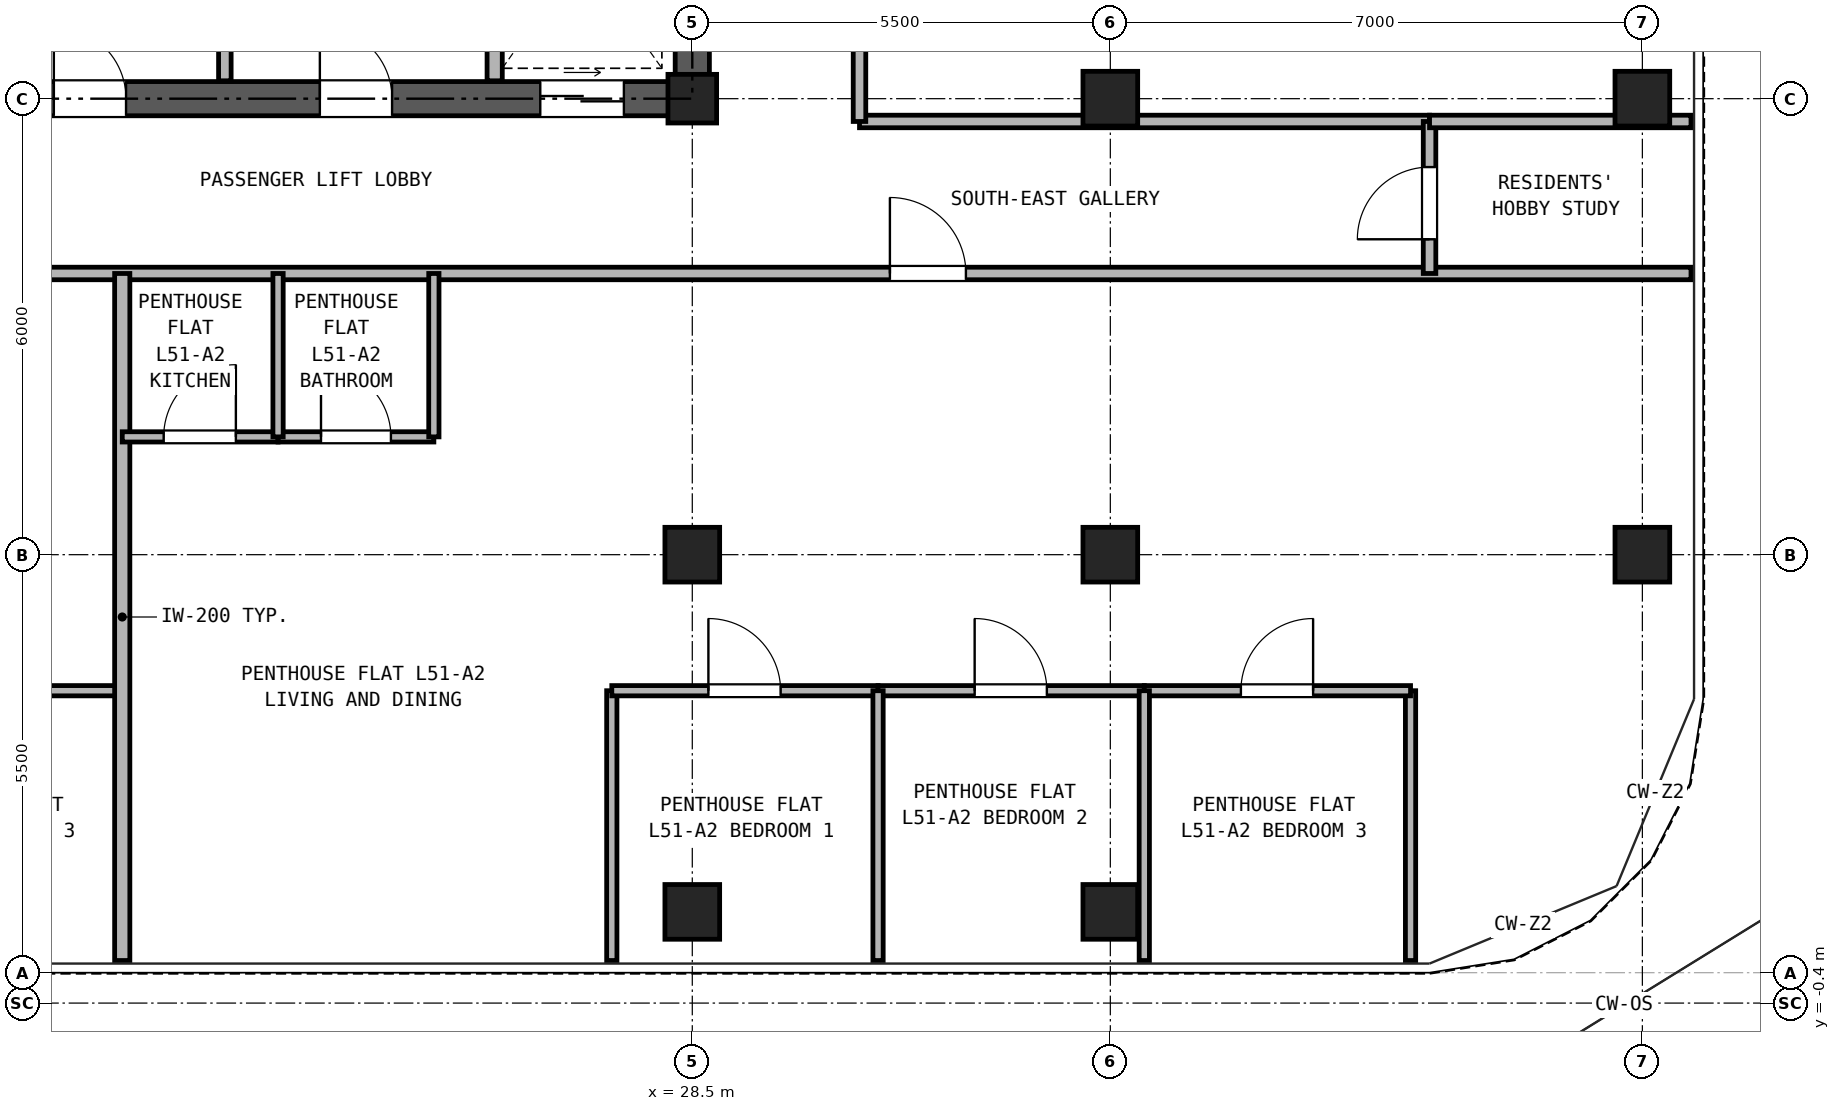
"""IFC4 building model, lengths in metres.
Left out: names, types, materials, properties, quantities, classifications, styles, units other than length and angle.
Written with IfcOpenShell. Run it as: python <this file> out.ifc"""

import sys

from ifc_helpers import new_model, si_unit, direction, frame, frame_2d, origin, origin_2d, place, context, subcontext, project, spatial, rectangle, hollow_rectangle, extrude, source, transform, mapped, element, fill, save


model = new_model("IFC4")
c1 = context("Model", 3, precision=1e-05, world=origin(), true_north=direction((0.0, 1.0)))
c2 = subcontext(c1, "Body", "Model", "MODEL_VIEW")
j1 = project(units=[si_unit("LENGTHUNIT", "METRE"), si_unit("PLANEANGLEUNIT", "RADIAN")], contexts=[c1])
p1 = place(None, origin())
s1 = spatial("IfcSite", under=j1, at=p1, CompositionType="ELEMENT")
p2 = place(p1, origin())
s2 = spatial("IfcBuilding", under=s1, at=p2, CompositionType="ELEMENT")
p3 = place(p2, frame((0.0, 0.0, 181.7)))
s3 = spatial("IfcBuildingStorey", under=s2, at=p3, CompositionType="ELEMENT", Elevation=181.7)
m1 = source(origin(), c2, "Body", "SweptSolid", [
    extrude(hollow_rectangle(XDim=0.72, YDim=0.72, WallThickness=0.04, at=origin_2d()), origin(), (0.0, 0.0, 1.0), 2.95),
])
for number, where, z_axis, x_axis in (
    (1, (28.5, 0.8, 0.0), (0.0, 0.0, 1.0), (1.0, 0.0, 0.0)),
    (2, (34.0, 0.8, 0.0), (0.0, 0.0, 1.0), (1.0, 0.0, 0.0)),
    (3, (41.0, 5.5, 0.0), (0.0, 0.0, 1.0), (1.0, 0.0, 0.0)),
    (4, (41.0, 11.5, 0.0), (0.0, 0.0, 1.0), (1.0, 0.0, 0.0)),
    (5, (28.5, 5.5, 0.0), (0.0, 0.0, 1.0), (1.0, 0.0, 0.0)),
):
    element("IfcColumn", number, at=place(p3, frame(where, z_axis=z_axis, x_axis=x_axis)), inside=s3, PredefinedType="COLUMN", context=c2, shape_type="MappedRepresentation", body=[
        mapped(m1, transform((0.0, 0.0, 0.0), x_axis=(1.0, 0.0, 0.0), y_axis=(0.0, 1.0, 0.0), z_axis=(0.0, 0.0, 1.0), scale=1.0)),
    ])
m2 = source(origin(), c2, "Body", "SweptSolid", [
    extrude(hollow_rectangle(XDim=0.64, YDim=0.64, WallThickness=0.035, at=origin_2d()), origin(), (0.0, 0.0, 1.0), 2.95),
])
p4 = place(p3, frame((28.5, 11.5, 0.0), z_axis=(0.0, 0.0, 1.0), x_axis=(1.0, 0.0, 0.0)))
e6 = element("IfcColumn", 6, at=p4, inside=s3, PredefinedType="COLUMN", context=c2, shape_type="MappedRepresentation", body=[
    mapped(m2, transform((0.0, 0.0, 0.0), x_axis=(1.0, 0.0, 0.0), y_axis=(0.0, 1.0, 0.0), z_axis=(0.0, 0.0, 1.0), scale=1.0)),
])
for number, where, z_axis, x_axis in (
    (7, (34.0, 5.5, 0.0), (0.0, 0.0, 1.0), (1.0, 0.0, 0.0)),
    (8, (34.0, 11.5, 0.0), (0.0, 0.0, 1.0), (1.0, 0.0, 0.0)),
):
    element("IfcColumn", number, at=place(p3, frame(where, z_axis=z_axis, x_axis=x_axis)), inside=s3, PredefinedType="COLUMN", context=c2, shape_type="MappedRepresentation", body=[
        mapped(m1, transform((0.0, 0.0, 0.0), x_axis=(1.0, 0.0, 0.0), y_axis=(0.0, 1.0, 0.0), z_axis=(0.0, 0.0, 1.0), scale=1.0)),
    ])
p5 = place(p3, frame((18.275, 11.5, 0.0), z_axis=(0.0, 0.0, 1.0), x_axis=(1.0, 0.0, 0.0)))
e9 = element("IfcWall", 9, at=p5, inside=s3, PredefinedType="SHEAR", context=c2, shape_type="SweptSolid", body=[
    extrude(rectangle(XDim=10.45, YDim=0.45, at=frame_2d((5.225, 0.0))), origin(), (0.0, 0.0, 1.0), 2.95),
])
p6 = place(p5, frame((1.825, 0.0, 0.0)))
e10 = element("IfcOpeningElement", 10, at=p6, cuts=e9, PredefinedType="OPENING", context=c2, shape_type="SweptSolid", body=[
    extrude(rectangle(XDim=0.95, YDim=2.15, at=frame_2d((0.475, 1.075))), frame((0.0, 0.235, 0.0), z_axis=(0.0, -1.0, 0.0), x_axis=(1.0, 0.0, 0.0)), (0.0, 0.0, 1.0), 0.47),
])
p7 = place(p5, frame((5.325, 0.0, 0.0)))
e11 = element("IfcOpeningElement", 11, at=p7, cuts=e9, PredefinedType="OPENING", context=c2, shape_type="SweptSolid", body=[
    extrude(rectangle(XDim=0.95, YDim=2.15, at=frame_2d((0.475, 1.075))), frame((0.0, 0.235, 0.0), z_axis=(0.0, -1.0, 0.0), x_axis=(1.0, 0.0, 0.0)), (0.0, 0.0, 1.0), 0.47),
])
p8 = place(p5, frame((8.225, 0.0, 0.0)))
e12 = element("IfcOpeningElement", 12, at=p8, cuts=e9, PredefinedType="OPENING", context=c2, shape_type="SweptSolid", body=[
    extrude(rectangle(XDim=1.1, YDim=2.25, at=frame_2d((0.55, 1.125))), frame((0.0, 0.235, 0.0), z_axis=(0.0, -1.0, 0.0), x_axis=(1.0, 0.0, 0.0)), (0.0, 0.0, 1.0), 0.47),
])
p9 = place(p3, frame((28.5, 11.725, 0.0), z_axis=(0.0, 0.0, 1.0), x_axis=(0.0, 1.0, 0.0)))
e13 = element("IfcWall", 13, at=p9, inside=s3, PredefinedType="SHEAR", context=c2, shape_type="SweptSolid", body=[
    extrude(rectangle(XDim=16.8, YDim=0.45, at=frame_2d((8.4, 0.0))), origin(), (0.0, 0.0, 1.0), 2.95),
])
p10 = place(p9, frame((7.425, 0.0, 0.0)))
e14 = element("IfcOpeningElement", 14, at=p10, cuts=e13, PredefinedType="OPENING", context=c2, shape_type="SweptSolid", body=[
    extrude(rectangle(XDim=1.15, YDim=2.2, at=frame_2d((0.575, 1.1))), frame((0.0, 0.235, 0.0), z_axis=(0.0, -1.0, 0.0), x_axis=(1.0, 0.0, 0.0)), (0.0, 0.0, 1.0), 0.47),
])
p11 = place(p3, frame((22.35, 11.735, 0.0), z_axis=(0.0, 0.0, 1.0), x_axis=(0.0, 1.0, 0.0)))
e15 = element("IfcWall", 15, at=p11, inside=s3, PredefinedType="PARTITIONING", context=c2, shape_type="SweptSolid", body=[
    extrude(rectangle(XDim=3.265, YDim=0.165, at=frame_2d((1.632, 0.0))), origin(), (0.0, 0.0, 1.0), 2.95),
])
p12 = place(p3, frame((25.9, 11.735, 0.0), z_axis=(0.0, 0.0, 1.0), x_axis=(0.0, 1.0, 0.0)))
e16 = element("IfcWall", 16, at=p12, inside=s3, PredefinedType="PARTITIONING", context=c2, shape_type="SweptSolid", body=[
    extrude(rectangle(XDim=3.265, YDim=0.2, at=frame_2d((1.632, 0.0))), origin(), (0.0, 0.0, 1.0), 2.95),
])
p13 = place(p3, frame((0.16, 9.2, 0.0), z_axis=(0.0, 0.0, 1.0), x_axis=(1.0, 0.0, 0.0)))
e17 = element("IfcWall", 17, at=p13, inside=s3, PredefinedType="PARTITIONING", context=c2, shape_type="SweptSolid", body=[
    extrude(rectangle(XDim=41.48, YDim=0.165, at=frame_2d((20.74, 0.0))), origin(), (0.0, 0.0, 1.0), 2.95),
])
p14 = place(p13, frame((15.565, 0.0, 0.0)))
e18 = element("IfcOpeningElement", 18, at=p14, cuts=e17, PredefinedType="OPENING", context=c2, shape_type="SweptSolid", body=[
    extrude(rectangle(XDim=1.0, YDim=2.15, at=frame_2d((0.5, 1.075))), frame((0.0, 0.093, 0.0), z_axis=(0.0, -1.0, 0.0), x_axis=(1.0, 0.0, 0.0)), (0.0, 0.0, 1.0), 0.185),
])
p15 = place(p13, frame((30.94, 0.0, 0.0)))
e19 = element("IfcOpeningElement", 19, at=p15, cuts=e17, PredefinedType="OPENING", context=c2, shape_type="SweptSolid", body=[
    extrude(rectangle(XDim=1.0, YDim=2.15, at=frame_2d((0.5, 1.075))), frame((0.0, 0.093, 0.0), z_axis=(0.0, -1.0, 0.0), x_axis=(1.0, 0.0, 0.0)), (0.0, 0.0, 1.0), 0.185),
])
p16 = place(p3, frame((30.7, 11.2, 0.0), z_axis=(0.0, 0.0, 1.0), x_axis=(1.0, 0.0, 0.0)))
e20 = element("IfcWall", 20, at=p16, inside=s3, PredefinedType="PARTITIONING", context=c2, shape_type="SweptSolid", body=[
    extrude(rectangle(XDim=7.5, YDim=0.165, at=frame_2d((3.75, 0.0))), origin(), (0.0, 0.0, 1.0), 2.95),
])
p17 = place(p3, frame((38.2, 9.2, 0.0), z_axis=(0.0, 0.0, 1.0), x_axis=(0.0, 1.0, 0.0)))
e21 = element("IfcWall", 21, at=p17, inside=s3, PredefinedType="PARTITIONING", context=c2, shape_type="SweptSolid", body=[
    extrude(rectangle(XDim=2.0, YDim=0.165, at=frame_2d((1.0, 0.0))), origin(), (0.0, 0.0, 1.0), 2.95),
])
p18 = place(p17, frame((0.45, 0.0, 0.0)))
e22 = element("IfcOpeningElement", 22, at=p18, cuts=e21, PredefinedType="OPENING", context=c2, shape_type="SweptSolid", body=[
    extrude(rectangle(XDim=0.95, YDim=2.15, at=frame_2d((0.475, 1.075))), frame((0.0, 0.093, 0.0), z_axis=(0.0, -1.0, 0.0), x_axis=(1.0, 0.0, 0.0)), (0.0, 0.0, 1.0), 0.185),
])
p19 = place(p3, frame((30.7, 11.2, 0.0), z_axis=(0.0, 0.0, 1.0), x_axis=(0.0, 1.0, 0.0)))
e23 = element("IfcWall", 23, at=p19, inside=s3, PredefinedType="PARTITIONING", context=c2, shape_type="SweptSolid", body=[
    extrude(rectangle(XDim=23.94, YDim=0.165, at=frame_2d((11.97, 0.0))), origin(), (0.0, 0.0, 1.0), 2.95),
])
p20 = place(p19, frame((5.15, 0.0, 0.0)))
e24 = element("IfcOpeningElement", 24, at=p20, cuts=e23, PredefinedType="OPENING", context=c2, shape_type="SweptSolid", body=[
    extrude(rectangle(XDim=0.95, YDim=2.15, at=frame_2d((0.475, 1.075))), frame((0.0, 0.093, 0.0), z_axis=(0.0, -1.0, 0.0), x_axis=(1.0, 0.0, 0.0)), (0.0, 0.0, 1.0), 0.185),
])
p21 = place(p19, frame((14.3, 0.0, 0.0)))
e25 = element("IfcOpeningElement", 25, at=p21, cuts=e23, PredefinedType="OPENING", context=c2, shape_type="SweptSolid", body=[
    extrude(rectangle(XDim=0.95, YDim=2.15, at=frame_2d((0.475, 1.075))), frame((0.0, 0.093, 0.0), z_axis=(0.0, -1.0, 0.0), x_axis=(1.0, 0.0, 0.0)), (0.0, 0.0, 1.0), 0.185),
])
p22 = place(p19, frame((20.62, 0.0, 0.0)))
e26 = element("IfcOpeningElement", 26, at=p22, cuts=e23, PredefinedType="OPENING", context=c2, shape_type="SweptSolid", body=[
    extrude(rectangle(XDim=0.95, YDim=2.15, at=frame_2d((0.475, 1.075))), frame((0.0, 0.093, 0.0), z_axis=(0.0, -1.0, 0.0), x_axis=(1.0, 0.0, 0.0)), (0.0, 0.0, 1.0), 0.185),
])
p23 = place(p3, frame((17.456, 3.71, 0.0), z_axis=(0.0, 0.0, 1.0), x_axis=(1.0, 0.0, 0.0)))
e27 = element("IfcWall", 27, at=p23, inside=s3, PredefinedType="PARTITIONING", context=c2, shape_type="SweptSolid", body=[
    extrude(rectangle(XDim=3.544, YDim=0.135, at=frame_2d((1.772, 0.0))), origin(), (0.0, 0.0, 1.0), 2.95),
])
p24 = place(p23, frame((1.292, 0.0, 0.0)))
e28 = element("IfcOpeningElement", 28, at=p24, cuts=e27, PredefinedType="OPENING", context=c2, shape_type="SweptSolid", body=[
    extrude(rectangle(XDim=0.95, YDim=2.15, at=frame_2d((0.475, 1.075))), frame((0.0, 0.077, 0.0), z_axis=(0.0, -1.0, 0.0), x_axis=(1.0, 0.0, 0.0)), (0.0, 0.0, 1.0), 0.155),
])
p25 = place(p3, frame((21.0, 0.16, 0.0), z_axis=(0.0, 0.0, 1.0), x_axis=(0.0, 1.0, 0.0)))
e29 = element("IfcWall", 29, at=p25, inside=s3, PredefinedType="PARTITIONING", context=c2, shape_type="SweptSolid", body=[
    extrude(rectangle(XDim=9.04, YDim=0.2, at=frame_2d((4.52, 0.0))), origin(), (0.0, 0.0, 1.0), 2.95),
])
p26 = place(p3, frame((21.0, 7.05, 0.0), z_axis=(0.0, 0.0, 1.0), x_axis=(1.0, 0.0, 0.0)))
e30 = element("IfcWall", 30, at=p26, inside=s3, PredefinedType="PARTITIONING", context=c2, shape_type="SweptSolid", body=[
    extrude(rectangle(XDim=2.05, YDim=0.135, at=frame_2d((1.025, 0.0))), origin(), (0.0, 0.0, 1.0), 2.95),
])
p27 = place(p26, frame((0.545, 0.0, 0.0)))
e31 = element("IfcOpeningElement", 31, at=p27, cuts=e30, PredefinedType="OPENING", context=c2, shape_type="SweptSolid", body=[
    extrude(rectangle(XDim=0.95, YDim=2.15, at=frame_2d((0.475, 1.075))), frame((0.0, 0.077, 0.0), z_axis=(0.0, -1.0, 0.0), x_axis=(1.0, 0.0, 0.0)), (0.0, 0.0, 1.0), 0.155),
])
p28 = place(p3, frame((23.05, 7.05, 0.0), z_axis=(0.0, 0.0, 1.0), x_axis=(1.0, 0.0, 0.0)))
e32 = element("IfcWall", 32, at=p28, inside=s3, PredefinedType="PARTITIONING", context=c2, shape_type="SweptSolid", body=[
    extrude(rectangle(XDim=2.05, YDim=0.135, at=frame_2d((1.025, 0.0))), origin(), (0.0, 0.0, 1.0), 2.95),
])
p29 = place(p28, frame((0.565, 0.0, 0.0)))
e33 = element("IfcOpeningElement", 33, at=p29, cuts=e32, PredefinedType="OPENING", context=c2, shape_type="SweptSolid", body=[
    extrude(rectangle(XDim=0.92, YDim=2.1, at=frame_2d((0.46, 1.05))), frame((0.0, 0.077, 0.0), z_axis=(0.0, -1.0, 0.0), x_axis=(1.0, 0.0, 0.0)), (0.0, 0.0, 1.0), 0.155),
])
for number, where, z_axis, x_axis in (
    (34, (23.05, 7.05, 0.0), (0.0, 0.0, 1.0), (0.0, 1.0, 0.0)),
    (35, (25.1, 7.05, 0.0), (0.0, 0.0, 1.0), (0.0, 1.0, 0.0)),
):
    element("IfcWall", number, at=place(p3, frame(where, z_axis=z_axis, x_axis=x_axis)), inside=s3, PredefinedType="PARTITIONING", context=c2, shape_type="SweptSolid", body=[
        extrude(rectangle(XDim=2.15, YDim=0.135, at=frame_2d((1.075, 0.0))), origin(), (0.0, 0.0, 1.0), 2.95),
    ])
for number, where, z_axis, x_axis in (
    (36, (27.441, 0.16, 0.0), (0.0, 0.0, 1.0), (0.0, 1.0, 0.0)),
    (37, (37.95, 0.16, 0.0), (0.0, 0.0, 1.0), (0.0, 1.0, 0.0)),
):
    element("IfcWall", number, at=place(p3, frame(where, z_axis=z_axis, x_axis=x_axis)), inside=s3, PredefinedType="PARTITIONING", context=c2, shape_type="SweptSolid", body=[
        extrude(rectangle(XDim=3.55, YDim=0.135, at=frame_2d((1.775, 0.0))), origin(), (0.0, 0.0, 1.0), 2.95),
    ])
p30 = place(p3, frame((27.441, 3.71, 0.0), z_axis=(0.0, 0.0, 1.0), x_axis=(1.0, 0.0, 0.0)))
e38 = element("IfcWall", 38, at=p30, inside=s3, PredefinedType="PARTITIONING", context=c2, shape_type="SweptSolid", body=[
    extrude(rectangle(XDim=3.503, YDim=0.135, at=frame_2d((1.751, 0.0))), origin(), (0.0, 0.0, 1.0), 2.95),
])
p31 = place(p30, frame((1.271, 0.0, 0.0)))
e39 = element("IfcOpeningElement", 39, at=p31, cuts=e38, PredefinedType="OPENING", context=c2, shape_type="SweptSolid", body=[
    extrude(rectangle(XDim=0.95, YDim=2.15, at=frame_2d((0.475, 1.075))), frame((0.0, 0.077, 0.0), z_axis=(0.0, -1.0, 0.0), x_axis=(1.0, 0.0, 0.0)), (0.0, 0.0, 1.0), 0.155),
])
p32 = place(p3, frame((30.944, 3.71, 0.0), z_axis=(0.0, 0.0, 1.0), x_axis=(1.0, 0.0, 0.0)))
e40 = element("IfcWall", 40, at=p32, inside=s3, PredefinedType="PARTITIONING", context=c2, shape_type="SweptSolid", body=[
    extrude(rectangle(XDim=3.503, YDim=0.135, at=frame_2d((1.751, 0.0))), origin(), (0.0, 0.0, 1.0), 2.95),
])
p33 = place(p32, frame((1.271, 0.0, 0.0)))
e41 = element("IfcOpeningElement", 41, at=p33, cuts=e40, PredefinedType="OPENING", context=c2, shape_type="SweptSolid", body=[
    extrude(rectangle(XDim=0.95, YDim=2.15, at=frame_2d((0.475, 1.075))), frame((0.0, 0.077, 0.0), z_axis=(0.0, -1.0, 0.0), x_axis=(1.0, 0.0, 0.0)), (0.0, 0.0, 1.0), 0.155),
])
p34 = place(p3, frame((30.944, 0.16, 0.0), z_axis=(0.0, 0.0, 1.0), x_axis=(0.0, 1.0, 0.0)))
e42 = element("IfcWall", 42, at=p34, inside=s3, PredefinedType="PARTITIONING", context=c2, shape_type="SweptSolid", body=[
    extrude(rectangle(XDim=3.55, YDim=0.135, at=frame_2d((1.775, 0.0))), origin(), (0.0, 0.0, 1.0), 2.95),
])
p35 = place(p3, frame((34.447, 3.71, 0.0), z_axis=(0.0, 0.0, 1.0), x_axis=(1.0, 0.0, 0.0)))
e43 = element("IfcWall", 43, at=p35, inside=s3, PredefinedType="PARTITIONING", context=c2, shape_type="SweptSolid", body=[
    extrude(rectangle(XDim=3.503, YDim=0.135, at=frame_2d((1.751, 0.0))), origin(), (0.0, 0.0, 1.0), 2.95),
])
p36 = place(p35, frame((1.271, 0.0, 0.0)))
e44 = element("IfcOpeningElement", 44, at=p36, cuts=e43, PredefinedType="OPENING", context=c2, shape_type="SweptSolid", body=[
    extrude(rectangle(XDim=0.95, YDim=2.15, at=frame_2d((0.475, 1.075))), frame((0.0, 0.077, 0.0), z_axis=(0.0, -1.0, 0.0), x_axis=(1.0, 0.0, 0.0)), (0.0, 0.0, 1.0), 0.155),
])
p37 = place(p3, frame((34.447, 0.16, 0.0), z_axis=(0.0, 0.0, 1.0), x_axis=(0.0, 1.0, 0.0)))
e45 = element("IfcWall", 45, at=p37, inside=s3, PredefinedType="PARTITIONING", context=c2, shape_type="SweptSolid", body=[
    extrude(rectangle(XDim=3.55, YDim=0.135, at=frame_2d((1.775, 0.0))), origin(), (0.0, 0.0, 1.0), 2.95),
])
p38 = place(p3, frame((38.2, 11.2, 0.0), z_axis=(0.0, 0.0, 1.0), x_axis=(1.0, 0.0, 0.0)))
e46 = element("IfcWall", 46, at=p38, inside=s3, PredefinedType="PARTITIONING", context=c2, shape_type="SweptSolid", body=[
    extrude(rectangle(XDim=3.44, YDim=0.165, at=frame_2d((1.72, 0.0))), origin(), (0.0, 0.0, 1.0), 2.95),
])
p39 = place(p6, frame((0.95, 0.0, 0.0), z_axis=(0.0, 0.0, 1.0), x_axis=(-1.0, 0.0, 0.0)))
e47 = element("IfcDoor", 47, at=p39, inside=s3, OperationType="SINGLE_SWING_LEFT", PredefinedType="DOOR", context=c2, shape_type="SweptSolid", body=[
    extrude(rectangle(XDim=0.95, YDim=2.15, at=frame_2d((0.475, 1.075))), frame((0.0, 0.025, 0.0), z_axis=(0.0, -1.0, 0.0), x_axis=(1.0, 0.0, 0.0)), (0.0, 0.0, 1.0), 0.05),
])
fill(e10, e47)
p40 = place(p7, frame((0.95, 0.0, 0.0), z_axis=(0.0, 0.0, 1.0), x_axis=(-1.0, 0.0, 0.0)))
e48 = element("IfcDoor", 48, at=p40, inside=s3, OperationType="SINGLE_SWING_LEFT", PredefinedType="DOOR", context=c2, shape_type="SweptSolid", body=[
    extrude(rectangle(XDim=0.95, YDim=2.15, at=frame_2d((0.475, 1.075))), frame((0.0, 0.025, 0.0), z_axis=(0.0, -1.0, 0.0), x_axis=(1.0, 0.0, 0.0)), (0.0, 0.0, 1.0), 0.05),
])
fill(e11, e48)
p41 = place(p8, frame((1.1, 0.0, 0.0), z_axis=(0.0, 0.0, 1.0), x_axis=(-1.0, 0.0, 0.0)))
e49 = element("IfcDoor", 49, at=p41, inside=s3, OperationType="DOUBLE_DOOR_SLIDING", PredefinedType="DOOR", context=c2, shape_type="SweptSolid", body=[
    extrude(rectangle(XDim=1.1, YDim=2.25, at=frame_2d((0.55, 1.125))), frame((0.0, 0.025, 0.0), z_axis=(0.0, -1.0, 0.0), x_axis=(1.0, 0.0, 0.0)), (0.0, 0.0, 1.0), 0.05),
])
fill(e12, e49)
p42 = place(p27, origin())
e50 = element("IfcDoor", 50, at=p42, inside=s3, OperationType="SINGLE_SWING_RIGHT", PredefinedType="DOOR", context=c2, shape_type="SweptSolid", body=[
    extrude(rectangle(XDim=0.95, YDim=2.15, at=frame_2d((0.475, 1.075))), frame((0.0, 0.025, 0.0), z_axis=(0.0, -1.0, 0.0), x_axis=(1.0, 0.0, 0.0)), (0.0, 0.0, 1.0), 0.05),
])
fill(e31, e50)
p43 = place(p29, origin())
e51 = element("IfcDoor", 51, at=p43, inside=s3, OperationType="SINGLE_SWING_LEFT", PredefinedType="DOOR", context=c2, shape_type="SweptSolid", body=[
    extrude(rectangle(XDim=0.92, YDim=2.1, at=frame_2d((0.46, 1.05))), frame((0.0, 0.025, 0.0), z_axis=(0.0, -1.0, 0.0), x_axis=(1.0, 0.0, 0.0)), (0.0, 0.0, 1.0), 0.05),
])
fill(e33, e51)
p44 = place(p31, frame((0.95, 0.0, 0.0), z_axis=(0.0, 0.0, 1.0), x_axis=(-1.0, 0.0, 0.0)))
e52 = element("IfcDoor", 52, at=p44, inside=s3, OperationType="SINGLE_SWING_LEFT", PredefinedType="DOOR", context=c2, shape_type="SweptSolid", body=[
    extrude(rectangle(XDim=0.95, YDim=2.15, at=frame_2d((0.475, 1.075))), frame((0.0, 0.025, 0.0), z_axis=(0.0, -1.0, 0.0), x_axis=(1.0, 0.0, 0.0)), (0.0, 0.0, 1.0), 0.05),
])
fill(e39, e52)
p45 = place(p33, frame((0.95, 0.0, 0.0), z_axis=(0.0, 0.0, 1.0), x_axis=(-1.0, 0.0, 0.0)))
e53 = element("IfcDoor", 53, at=p45, inside=s3, OperationType="SINGLE_SWING_LEFT", PredefinedType="DOOR", context=c2, shape_type="SweptSolid", body=[
    extrude(rectangle(XDim=0.95, YDim=2.15, at=frame_2d((0.475, 1.075))), frame((0.0, 0.025, 0.0), z_axis=(0.0, -1.0, 0.0), x_axis=(1.0, 0.0, 0.0)), (0.0, 0.0, 1.0), 0.05),
])
fill(e41, e53)
p46 = place(p36, frame((0.95, 0.0, 0.0), z_axis=(0.0, 0.0, 1.0), x_axis=(-1.0, 0.0, 0.0)))
e54 = element("IfcDoor", 54, at=p46, inside=s3, OperationType="SINGLE_SWING_RIGHT", PredefinedType="DOOR", context=c2, shape_type="SweptSolid", body=[
    extrude(rectangle(XDim=0.95, YDim=2.15, at=frame_2d((0.475, 1.075))), frame((0.0, 0.025, 0.0), z_axis=(0.0, -1.0, 0.0), x_axis=(1.0, 0.0, 0.0)), (0.0, 0.0, 1.0), 0.05),
])
fill(e44, e54)
p47 = place(p15, frame((1.0, 0.0, 0.0), z_axis=(0.0, 0.0, 1.0), x_axis=(-1.0, 0.0, 0.0)))
e55 = element("IfcDoor", 55, at=p47, inside=s3, OperationType="SINGLE_SWING_LEFT", PredefinedType="DOOR", context=c2, shape_type="SweptSolid", body=[
    extrude(rectangle(XDim=1.0, YDim=2.15, at=frame_2d((0.5, 1.075))), frame((0.0, 0.025, 0.0), z_axis=(0.0, -1.0, 0.0), x_axis=(1.0, 0.0, 0.0)), (0.0, 0.0, 1.0), 0.05),
])
fill(e19, e55)
p48 = place(p18, origin())
e56 = element("IfcDoor", 56, at=p48, inside=s3, OperationType="SINGLE_SWING_LEFT", PredefinedType="DOOR", context=c2, shape_type="SweptSolid", body=[
    extrude(rectangle(XDim=0.95, YDim=2.15, at=frame_2d((0.475, 1.075))), frame((0.0, 0.025, 0.0), z_axis=(0.0, -1.0, 0.0), x_axis=(1.0, 0.0, 0.0)), (0.0, 0.0, 1.0), 0.05),
])
fill(e22, e56)
save(model, sys.argv[1])
